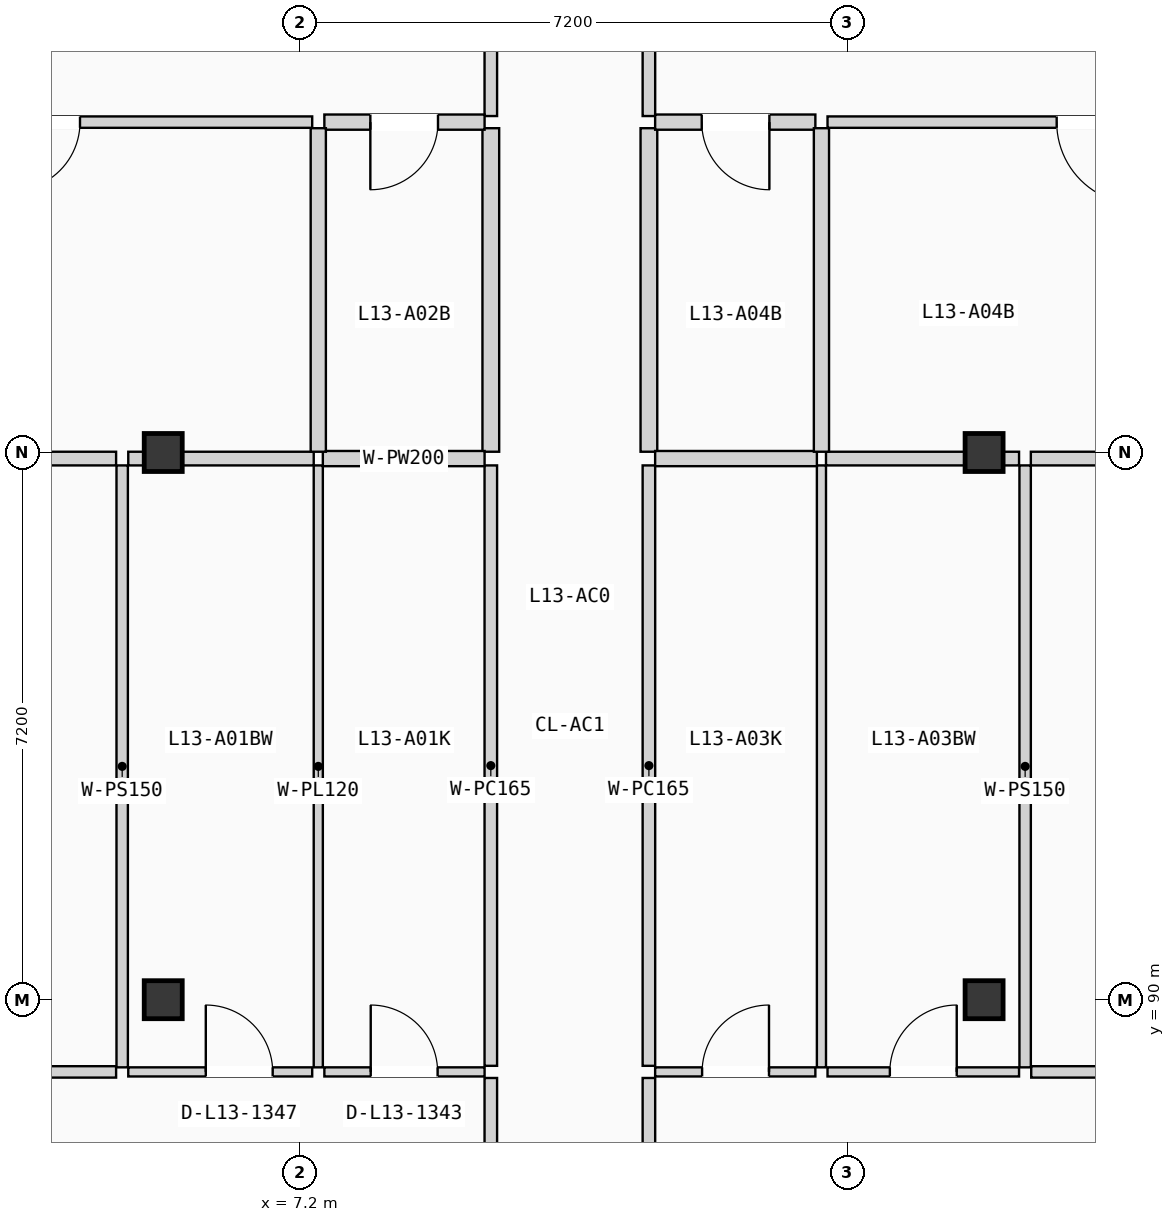
"""IFC4 building model, lengths in metres.
Left out: names, types, materials, properties, quantities, classifications, styles, units other than length and angle.
Written with IfcOpenShell. Run it as: python <this file> out.ifc"""

import sys

from ifc_helpers import new_model, si_unit, direction, frame, frame_2d, origin, origin_2d, place, context, subcontext, project, spatial, rectangle, extrude, element, fill, save


model = new_model("IFC4")
c1 = context("Model", 3, precision=1e-05, world=origin(), true_north=direction((0.0, 1.0)))
c2 = subcontext(c1, "Body", "Model", "MODEL_VIEW")
j1 = project(units=[si_unit("LENGTHUNIT", "METRE"), si_unit("PLANEANGLEUNIT", "RADIAN")], contexts=[c1])
p1 = place(None, origin())
s1 = spatial("IfcSite", under=j1, at=p1, CompositionType="ELEMENT")
p2 = place(p1, origin())
s2 = spatial("IfcBuilding", under=s1, at=p2, CompositionType="ELEMENT")
p3 = place(p2, frame((0.0, 0.0, 43.575)))
s3 = spatial("IfcBuildingStorey", under=s2, at=p3, CompositionType="ELEMENT", Elevation=43.575)
for number, where, z_axis, x_axis in (
    (1, (5.4, 90.0, 0.0), (0.0, 0.0, 1.0), (1.0, 0.0, 0.0)),
    (2, (5.4, 97.2, 0.0), (0.0, 0.0, 1.0), (1.0, 0.0, 0.0)),
    (3, (16.2, 90.0, 0.0), (0.0, 0.0, 1.0), (1.0, 0.0, 0.0)),
    (4, (16.2, 97.2, 0.0), (0.0, 0.0, 1.0), (1.0, 0.0, 0.0)),
):
    element("IfcColumn", number, at=place(p3, frame(where, z_axis=z_axis, x_axis=x_axis)), inside=s3, PredefinedType="COLUMN", context=c2, shape_type="SweptSolid", body=[
        extrude(rectangle(XDim=0.5, YDim=0.5, at=origin_2d()), origin(), (0.0, 0.0, 1.0), 3.15),
    ])
p4 = place(p3, frame((9.71, 83.83, 0.0), z_axis=(0.0, 0.0, 1.0), x_axis=(0.0, 1.0, 0.0)))
e5 = element("IfcWall", 5, at=p4, inside=s3, PredefinedType="PARTITIONING", context=c2, shape_type="SweptSolid", body=[
    extrude(rectangle(XDim=5.14, YDim=0.165, at=frame_2d((2.57, 0.0))), origin(), (0.0, 0.0, 1.0), 2.87),
])
p5 = place(p4, frame((2.08, 0.0, 0.0)))
e6 = element("IfcOpeningElement", 6, at=p5, cuts=e5, PredefinedType="OPENING", context=c2, shape_type="SweptSolid", body=[
    extrude(rectangle(XDim=0.98, YDim=2.08, at=frame_2d((0.49, 1.04))), frame((0.0, 0.093, 0.0), z_axis=(0.0, -1.0, 0.0), x_axis=(1.0, 0.0, 0.0)), (0.0, 0.0, 1.0), 0.185),
])
p6 = place(p3, frame((9.71, 89.13, 0.0), z_axis=(0.0, 0.0, 1.0), x_axis=(0.0, 1.0, 0.0)))
e7 = element("IfcWall", 7, at=p6, inside=s3, PredefinedType="PARTITIONING", context=c2, shape_type="SweptSolid", body=[
    extrude(rectangle(XDim=7.9, YDim=0.165, at=frame_2d((3.95, 0.0))), origin(), (0.0, 0.0, 1.0), 2.87),
])
p7 = place(p3, frame((9.71, 101.627, 0.0), z_axis=(0.0, 0.0, 1.0), x_axis=(0.0, 1.0, 0.0)))
e8 = element("IfcWall", 8, at=p7, inside=s3, PredefinedType="PARTITIONING", context=c2, shape_type="SweptSolid", body=[
    extrude(rectangle(XDim=5.156, YDim=0.165, at=frame_2d((2.578, 0.0))), origin(), (0.0, 0.0, 1.0), 2.87),
])
p8 = place(p7, frame((2.088, 0.0, 0.0)))
e9 = element("IfcOpeningElement", 9, at=p8, cuts=e8, PredefinedType="OPENING", context=c2, shape_type="SweptSolid", body=[
    extrude(rectangle(XDim=0.98, YDim=2.08, at=frame_2d((0.49, 1.04))), frame((0.0, 0.093, 0.0), z_axis=(0.0, -1.0, 0.0), x_axis=(1.0, 0.0, 0.0)), (0.0, 0.0, 1.0), 0.185),
])
p9 = place(p3, frame((9.71, 97.21, 0.0), z_axis=(0.0, 0.0, 1.0), x_axis=(0.0, 1.0, 0.0)))
e10 = element("IfcWall", 10, at=p9, inside=s3, PredefinedType="PLUMBINGWALL", context=c2, shape_type="SweptSolid", body=[
    extrude(rectangle(XDim=4.257, YDim=0.22, at=frame_2d((2.128, 0.0))), origin(), (0.0, 0.0, 1.0), 2.87),
])
p10 = place(p3, frame((11.79, 83.83, 0.0), z_axis=(0.0, 0.0, 1.0), x_axis=(0.0, 1.0, 0.0)))
e11 = element("IfcWall", 11, at=p10, inside=s3, PredefinedType="PARTITIONING", context=c2, shape_type="SweptSolid", body=[
    extrude(rectangle(XDim=5.14, YDim=0.165, at=frame_2d((2.57, 0.0))), origin(), (0.0, 0.0, 1.0), 2.87),
])
p11 = place(p10, frame((2.08, 0.0, 0.0)))
e12 = element("IfcOpeningElement", 12, at=p11, cuts=e11, PredefinedType="OPENING", context=c2, shape_type="SweptSolid", body=[
    extrude(rectangle(XDim=0.98, YDim=2.08, at=frame_2d((0.49, 1.04))), frame((0.0, 0.093, 0.0), z_axis=(0.0, -1.0, 0.0), x_axis=(1.0, 0.0, 0.0)), (0.0, 0.0, 1.0), 0.185),
])
p12 = place(p3, frame((11.79, 89.13, 0.0), z_axis=(0.0, 0.0, 1.0), x_axis=(0.0, 1.0, 0.0)))
e13 = element("IfcWall", 13, at=p12, inside=s3, PredefinedType="PARTITIONING", context=c2, shape_type="SweptSolid", body=[
    extrude(rectangle(XDim=7.9, YDim=0.165, at=frame_2d((3.95, 0.0))), origin(), (0.0, 0.0, 1.0), 2.87),
])
p13 = place(p3, frame((11.79, 101.627, 0.0), z_axis=(0.0, 0.0, 1.0), x_axis=(0.0, 1.0, 0.0)))
e14 = element("IfcWall", 14, at=p13, inside=s3, PredefinedType="PARTITIONING", context=c2, shape_type="SweptSolid", body=[
    extrude(rectangle(XDim=5.156, YDim=0.165, at=frame_2d((2.578, 0.0))), origin(), (0.0, 0.0, 1.0), 2.87),
])
p14 = place(p13, frame((2.088, 0.0, 0.0)))
e15 = element("IfcOpeningElement", 15, at=p14, cuts=e14, PredefinedType="OPENING", context=c2, shape_type="SweptSolid", body=[
    extrude(rectangle(XDim=0.98, YDim=2.08, at=frame_2d((0.49, 1.04))), frame((0.0, 0.093, 0.0), z_axis=(0.0, -1.0, 0.0), x_axis=(1.0, 0.0, 0.0)), (0.0, 0.0, 1.0), 0.185),
])
p15 = place(p3, frame((11.79, 97.21, 0.0), z_axis=(0.0, 0.0, 1.0), x_axis=(0.0, 1.0, 0.0)))
e16 = element("IfcWall", 16, at=p15, inside=s3, PredefinedType="PLUMBINGWALL", context=c2, shape_type="SweptSolid", body=[
    extrude(rectangle(XDim=4.257, YDim=0.22, at=frame_2d((2.128, 0.0))), origin(), (0.0, 0.0, 1.0), 2.87),
])
p16 = place(p3, frame((7.52, 89.05, 0.0), z_axis=(0.0, 0.0, 1.0), x_axis=(1.0, 0.0, 0.0)))
e17 = element("IfcWall", 17, at=p16, inside=s3, PredefinedType="PARTITIONING", context=c2, shape_type="SweptSolid", body=[
    extrude(rectangle(XDim=2.108, YDim=0.12, at=frame_2d((1.054, 0.0))), origin(), (0.0, 0.0, 1.0), 2.87),
])
p17 = place(p16, frame((0.61, 0.0, 0.0)))
e18 = element("IfcOpeningElement", 18, at=p17, cuts=e17, PredefinedType="OPENING", context=c2, shape_type="SweptSolid", body=[
    extrude(rectangle(XDim=0.88, YDim=2.02, at=frame_2d((0.44, 1.01))), frame((0.0, 0.07, 0.0), z_axis=(0.0, -1.0, 0.0), x_axis=(1.0, 0.0, 0.0)), (0.0, 0.0, 1.0), 0.14),
])
p18 = place(p3, frame((0.32, 89.05, 0.0), z_axis=(0.0, 0.0, 1.0), x_axis=(1.0, 0.0, 0.0)))
e19 = element("IfcWall", 19, at=p18, inside=s3, PredefinedType="PARTITIONING", context=c2, shape_type="SweptSolid", body=[
    extrude(rectangle(XDim=4.46, YDim=0.15, at=frame_2d((2.23, 0.0))), origin(), (0.0, 0.0, 1.0), 2.87),
])
p19 = place(p18, frame((1.725, 0.0, 0.0)))
e20 = element("IfcOpeningElement", 20, at=p19, cuts=e19, PredefinedType="OPENING", context=c2, shape_type="SweptSolid", body=[
    extrude(rectangle(XDim=1.04, YDim=2.08, at=frame_2d((0.52, 1.04))), frame((0.0, 0.085, 0.0), z_axis=(0.0, -1.0, 0.0), x_axis=(1.0, 0.0, 0.0)), (0.0, 0.0, 1.0), 0.17),
])
p20 = place(p3, frame((4.94, 89.05, 0.0), z_axis=(0.0, 0.0, 1.0), x_axis=(1.0, 0.0, 0.0)))
e21 = element("IfcWall", 21, at=p20, inside=s3, PredefinedType="PARTITIONING", context=c2, shape_type="SweptSolid", body=[
    extrude(rectangle(XDim=2.42, YDim=0.12, at=frame_2d((1.21, 0.0))), origin(), (0.0, 0.0, 1.0), 2.87),
])
p21 = place(p20, frame((1.02, 0.0, 0.0)))
e22 = element("IfcOpeningElement", 22, at=p21, cuts=e21, PredefinedType="OPENING", context=c2, shape_type="SweptSolid", body=[
    extrude(rectangle(XDim=0.88, YDim=2.02, at=frame_2d((0.44, 1.01))), frame((0.0, 0.07, 0.0), z_axis=(0.0, -1.0, 0.0), x_axis=(1.0, 0.0, 0.0)), (0.0, 0.0, 1.0), 0.14),
])
p22 = place(p3, frame((7.44, 89.11, 0.0), z_axis=(0.0, 0.0, 1.0), x_axis=(0.0, 1.0, 0.0)))
e23 = element("IfcWall", 23, at=p22, inside=s3, PredefinedType="PARTITIONING", context=c2, shape_type="SweptSolid", body=[
    extrude(rectangle(XDim=7.92, YDim=0.12, at=frame_2d((3.96, 0.0))), origin(), (0.0, 0.0, 1.0), 2.87),
])
p23 = place(p3, frame((7.5, 97.12, 0.0), z_axis=(0.0, 0.0, 1.0), x_axis=(1.0, 0.0, 0.0)))
e24 = element("IfcWall", 24, at=p23, inside=s3, PredefinedType="PLUMBINGWALL", context=c2, shape_type="SweptSolid", body=[
    extrude(rectangle(XDim=2.128, YDim=0.2, at=frame_2d((1.064, 0.0))), origin(), (0.0, 0.0, 1.0), 2.17),
])
p24 = place(p3, frame((4.86, 89.11, 0.0), z_axis=(0.0, 0.0, 1.0), x_axis=(0.0, 1.0, 0.0)))
e25 = element("IfcWall", 25, at=p24, inside=s3, PredefinedType="PARTITIONING", context=c2, shape_type="SweptSolid", body=[
    extrude(rectangle(XDim=7.92, YDim=0.15, at=frame_2d((3.96, 0.0))), origin(), (0.0, 0.0, 1.0), 2.87),
])
p25 = place(p3, frame((0.32, 97.12, 0.0), z_axis=(0.0, 0.0, 1.0), x_axis=(1.0, 0.0, 0.0)))
e26 = element("IfcWall", 26, at=p25, inside=s3, PredefinedType="PARTITIONING", context=c2, shape_type="SweptSolid", body=[
    extrude(rectangle(XDim=4.46, YDim=0.18, at=frame_2d((2.23, 0.0))), origin(), (0.0, 0.0, 1.0), 2.22),
])
p26 = place(p3, frame((4.94, 97.12, 0.0), z_axis=(0.0, 0.0, 1.0), x_axis=(1.0, 0.0, 0.0)))
e27 = element("IfcWall", 27, at=p26, inside=s3, PredefinedType="PARTITIONING", context=c2, shape_type="SweptSolid", body=[
    extrude(rectangle(XDim=2.44, YDim=0.18, at=frame_2d((1.22, 0.0))), origin(), (0.0, 0.0, 1.0), 2.17),
])
p27 = place(p3, frame((7.52, 101.547, 0.0), z_axis=(0.0, 0.0, 1.0), x_axis=(1.0, 0.0, 0.0)))
e28 = element("IfcWall", 28, at=p27, inside=s3, PredefinedType="PLUMBINGWALL", context=c2, shape_type="SweptSolid", body=[
    extrude(rectangle(XDim=2.108, YDim=0.2, at=frame_2d((1.054, 0.0))), origin(), (0.0, 0.0, 1.0), 2.87),
])
p28 = place(p27, frame((0.605, 0.0, 0.0)))
e29 = element("IfcOpeningElement", 29, at=p28, cuts=e28, PredefinedType="OPENING", context=c2, shape_type="SweptSolid", body=[
    extrude(rectangle(XDim=0.89, YDim=2.03, at=frame_2d((0.445, 1.015))), frame((0.0, 0.11, 0.0), z_axis=(0.0, -1.0, 0.0), x_axis=(1.0, 0.0, 0.0)), (0.0, 0.0, 1.0), 0.22),
])
p29 = place(p3, frame((0.32, 101.547, 0.0), z_axis=(0.0, 0.0, 1.0), x_axis=(1.0, 0.0, 0.0)))
e30 = element("IfcWall", 30, at=p29, inside=s3, PredefinedType="PARTITIONING", context=c2, shape_type="SweptSolid", body=[
    extrude(rectangle(XDim=7.04, YDim=0.15, at=frame_2d((3.52, 0.0))), origin(), (0.0, 0.0, 1.0), 2.87),
])
p30 = place(p29, frame((3.085, 0.0, 0.0)))
e31 = element("IfcOpeningElement", 31, at=p30, cuts=e30, PredefinedType="OPENING", context=c2, shape_type="SweptSolid", body=[
    extrude(rectangle(XDim=0.9, YDim=2.04, at=frame_2d((0.45, 1.02))), frame((0.0, 0.085, 0.0), z_axis=(0.0, -1.0, 0.0), x_axis=(1.0, 0.0, 0.0)), (0.0, 0.0, 1.0), 0.17),
])
p31 = place(p3, frame((7.44, 97.21, 0.0), z_axis=(0.0, 0.0, 1.0), x_axis=(0.0, 1.0, 0.0)))
e32 = element("IfcWall", 32, at=p31, inside=s3, PredefinedType="PLUMBINGWALL", context=c2, shape_type="SweptSolid", body=[
    extrude(rectangle(XDim=4.257, YDim=0.2, at=frame_2d((2.128, 0.0))), origin(), (0.0, 0.0, 1.0), 2.87),
])
p32 = place(p3, frame((11.872, 89.05, 0.0), z_axis=(0.0, 0.0, 1.0), x_axis=(1.0, 0.0, 0.0)))
e33 = element("IfcWall", 33, at=p32, inside=s3, PredefinedType="PARTITIONING", context=c2, shape_type="SweptSolid", body=[
    extrude(rectangle(XDim=2.108, YDim=0.12, at=frame_2d((1.054, 0.0))), origin(), (0.0, 0.0, 1.0), 2.87),
])
p33 = place(p32, frame((0.618, 0.0, 0.0)))
e34 = element("IfcOpeningElement", 34, at=p33, cuts=e33, PredefinedType="OPENING", context=c2, shape_type="SweptSolid", body=[
    extrude(rectangle(XDim=0.88, YDim=2.02, at=frame_2d((0.44, 1.01))), frame((0.0, 0.07, 0.0), z_axis=(0.0, -1.0, 0.0), x_axis=(1.0, 0.0, 0.0)), (0.0, 0.0, 1.0), 0.14),
])
p34 = place(p3, frame((16.82, 89.05, 0.0), z_axis=(0.0, 0.0, 1.0), x_axis=(1.0, 0.0, 0.0)))
e35 = element("IfcWall", 35, at=p34, inside=s3, PredefinedType="PARTITIONING", context=c2, shape_type="SweptSolid", body=[
    extrude(rectangle(XDim=4.46, YDim=0.15, at=frame_2d((2.23, 0.0))), origin(), (0.0, 0.0, 1.0), 2.87),
])
p35 = place(p34, frame((1.715, 0.0, 0.0)))
e36 = element("IfcOpeningElement", 36, at=p35, cuts=e35, PredefinedType="OPENING", context=c2, shape_type="SweptSolid", body=[
    extrude(rectangle(XDim=1.0, YDim=2.06, at=frame_2d((0.5, 1.03))), frame((0.0, 0.085, 0.0), z_axis=(0.0, -1.0, 0.0), x_axis=(1.0, 0.0, 0.0)), (0.0, 0.0, 1.0), 0.17),
])
p36 = place(p3, frame((14.14, 89.05, 0.0), z_axis=(0.0, 0.0, 1.0), x_axis=(1.0, 0.0, 0.0)))
e37 = element("IfcWall", 37, at=p36, inside=s3, PredefinedType="PARTITIONING", context=c2, shape_type="SweptSolid", body=[
    extrude(rectangle(XDim=2.52, YDim=0.12, at=frame_2d((1.26, 0.0))), origin(), (0.0, 0.0, 1.0), 2.87),
])
p37 = place(p36, frame((0.82, 0.0, 0.0)))
e38 = element("IfcOpeningElement", 38, at=p37, cuts=e37, PredefinedType="OPENING", context=c2, shape_type="SweptSolid", body=[
    extrude(rectangle(XDim=0.88, YDim=2.02, at=frame_2d((0.44, 1.01))), frame((0.0, 0.07, 0.0), z_axis=(0.0, -1.0, 0.0), x_axis=(1.0, 0.0, 0.0)), (0.0, 0.0, 1.0), 0.14),
])
p38 = place(p3, frame((14.06, 89.11, 0.0), z_axis=(0.0, 0.0, 1.0), x_axis=(0.0, 1.0, 0.0)))
e39 = element("IfcWall", 39, at=p38, inside=s3, PredefinedType="PARTITIONING", context=c2, shape_type="SweptSolid", body=[
    extrude(rectangle(XDim=7.92, YDim=0.12, at=frame_2d((3.96, 0.0))), origin(), (0.0, 0.0, 1.0), 2.87),
])
p39 = place(p3, frame((11.872, 97.12, 0.0), z_axis=(0.0, 0.0, 1.0), x_axis=(1.0, 0.0, 0.0)))
e40 = element("IfcWall", 40, at=p39, inside=s3, PredefinedType="PLUMBINGWALL", context=c2, shape_type="SweptSolid", body=[
    extrude(rectangle(XDim=2.128, YDim=0.2, at=frame_2d((1.064, 0.0))), origin(), (0.0, 0.0, 1.0), 2.17),
])
p40 = place(p3, frame((16.74, 89.11, 0.0), z_axis=(0.0, 0.0, 1.0), x_axis=(0.0, 1.0, 0.0)))
e41 = element("IfcWall", 41, at=p40, inside=s3, PredefinedType="PARTITIONING", context=c2, shape_type="SweptSolid", body=[
    extrude(rectangle(XDim=7.92, YDim=0.15, at=frame_2d((3.96, 0.0))), origin(), (0.0, 0.0, 1.0), 2.87),
])
p41 = place(p3, frame((16.815, 97.12, 0.0), z_axis=(0.0, 0.0, 1.0), x_axis=(1.0, 0.0, 0.0)))
e42 = element("IfcWall", 42, at=p41, inside=s3, PredefinedType="PARTITIONING", context=c2, shape_type="SweptSolid", body=[
    extrude(rectangle(XDim=4.465, YDim=0.18, at=frame_2d((2.232, 0.0))), origin(), (0.0, 0.0, 1.0), 2.22),
])
p42 = place(p3, frame((14.12, 97.12, 0.0), z_axis=(0.0, 0.0, 1.0), x_axis=(1.0, 0.0, 0.0)))
e43 = element("IfcWall", 43, at=p42, inside=s3, PredefinedType="PARTITIONING", context=c2, shape_type="SweptSolid", body=[
    extrude(rectangle(XDim=2.54, YDim=0.18, at=frame_2d((1.27, 0.0))), origin(), (0.0, 0.0, 1.0), 2.17),
])
p43 = place(p3, frame((11.872, 101.547, 0.0), z_axis=(0.0, 0.0, 1.0), x_axis=(1.0, 0.0, 0.0)))
e44 = element("IfcWall", 44, at=p43, inside=s3, PredefinedType="PLUMBINGWALL", context=c2, shape_type="SweptSolid", body=[
    extrude(rectangle(XDim=2.108, YDim=0.2, at=frame_2d((1.054, 0.0))), origin(), (0.0, 0.0, 1.0), 2.87),
])
p44 = place(p43, frame((0.613, 0.0, 0.0)))
e45 = element("IfcOpeningElement", 45, at=p44, cuts=e44, PredefinedType="OPENING", context=c2, shape_type="SweptSolid", body=[
    extrude(rectangle(XDim=0.89, YDim=2.03, at=frame_2d((0.445, 1.015))), frame((0.0, 0.11, 0.0), z_axis=(0.0, -1.0, 0.0), x_axis=(1.0, 0.0, 0.0)), (0.0, 0.0, 1.0), 0.22),
])
p45 = place(p3, frame((14.14, 101.547, 0.0), z_axis=(0.0, 0.0, 1.0), x_axis=(1.0, 0.0, 0.0)))
e46 = element("IfcWall", 46, at=p45, inside=s3, PredefinedType="PARTITIONING", context=c2, shape_type="SweptSolid", body=[
    extrude(rectangle(XDim=7.14, YDim=0.15, at=frame_2d((3.57, 0.0))), origin(), (0.0, 0.0, 1.0), 2.87),
])
p46 = place(p45, frame((3.015, 0.0, 0.0)))
e47 = element("IfcOpeningElement", 47, at=p46, cuts=e46, PredefinedType="OPENING", context=c2, shape_type="SweptSolid", body=[
    extrude(rectangle(XDim=1.08, YDim=2.1, at=frame_2d((0.54, 1.05))), frame((0.0, 0.085, 0.0), z_axis=(0.0, -1.0, 0.0), x_axis=(1.0, 0.0, 0.0)), (0.0, 0.0, 1.0), 0.17),
])
p47 = place(p3, frame((14.06, 97.21, 0.0), z_axis=(0.0, 0.0, 1.0), x_axis=(0.0, 1.0, 0.0)))
e48 = element("IfcWall", 48, at=p47, inside=s3, PredefinedType="PLUMBINGWALL", context=c2, shape_type="SweptSolid", body=[
    extrude(rectangle(XDim=4.257, YDim=0.2, at=frame_2d((2.128, 0.0))), origin(), (0.0, 0.0, 1.0), 2.87),
])
p48 = place(p17, origin())
e49 = element("IfcDoor", 49, at=p48, inside=s3, OperationType="SINGLE_SWING_LEFT", PredefinedType="DOOR", context=c2, shape_type="SweptSolid", body=[
    extrude(rectangle(XDim=0.88, YDim=2.02, at=frame_2d((0.44, 1.01))), frame((0.0, 0.025, 0.0), z_axis=(0.0, -1.0, 0.0), x_axis=(1.0, 0.0, 0.0)), (0.0, 0.0, 1.0), 0.05),
])
fill(e18, e49)
p49 = place(p21, origin())
e50 = element("IfcDoor", 50, at=p49, inside=s3, OperationType="SINGLE_SWING_LEFT", PredefinedType="DOOR", context=c2, shape_type="SweptSolid", body=[
    extrude(rectangle(XDim=0.88, YDim=2.02, at=frame_2d((0.44, 1.01))), frame((0.0, 0.025, 0.0), z_axis=(0.0, -1.0, 0.0), x_axis=(1.0, 0.0, 0.0)), (0.0, 0.0, 1.0), 0.05),
])
fill(e22, e50)
p50 = place(p28, frame((0.89, 0.0, 0.0), z_axis=(0.0, 0.0, 1.0), x_axis=(-1.0, 0.0, 0.0)))
e51 = element("IfcDoor", 51, at=p50, inside=s3, OperationType="SINGLE_SWING_LEFT", PredefinedType="DOOR", context=c2, shape_type="SweptSolid", body=[
    extrude(rectangle(XDim=0.89, YDim=2.03, at=frame_2d((0.445, 1.015))), frame((0.0, 0.025, 0.0), z_axis=(0.0, -1.0, 0.0), x_axis=(1.0, 0.0, 0.0)), (0.0, 0.0, 1.0), 0.05),
])
fill(e29, e51)
p51 = place(p30, frame((0.9, 0.0, 0.0), z_axis=(0.0, 0.0, 1.0), x_axis=(-1.0, 0.0, 0.0)))
e52 = element("IfcDoor", 52, at=p51, inside=s3, OperationType="SINGLE_SWING_LEFT", PredefinedType="DOOR", context=c2, shape_type="SweptSolid", body=[
    extrude(rectangle(XDim=0.9, YDim=2.04, at=frame_2d((0.45, 1.02))), frame((0.0, 0.025, 0.0), z_axis=(0.0, -1.0, 0.0), x_axis=(1.0, 0.0, 0.0)), (0.0, 0.0, 1.0), 0.05),
])
fill(e31, e52)
p52 = place(p33, origin())
e53 = element("IfcDoor", 53, at=p52, inside=s3, OperationType="SINGLE_SWING_RIGHT", PredefinedType="DOOR", context=c2, shape_type="SweptSolid", body=[
    extrude(rectangle(XDim=0.88, YDim=2.02, at=frame_2d((0.44, 1.01))), frame((0.0, 0.025, 0.0), z_axis=(0.0, -1.0, 0.0), x_axis=(1.0, 0.0, 0.0)), (0.0, 0.0, 1.0), 0.05),
])
fill(e34, e53)
p53 = place(p37, origin())
e54 = element("IfcDoor", 54, at=p53, inside=s3, OperationType="SINGLE_SWING_RIGHT", PredefinedType="DOOR", context=c2, shape_type="SweptSolid", body=[
    extrude(rectangle(XDim=0.88, YDim=2.02, at=frame_2d((0.44, 1.01))), frame((0.0, 0.025, 0.0), z_axis=(0.0, -1.0, 0.0), x_axis=(1.0, 0.0, 0.0)), (0.0, 0.0, 1.0), 0.05),
])
fill(e38, e54)
p54 = place(p44, frame((0.89, 0.0, 0.0), z_axis=(0.0, 0.0, 1.0), x_axis=(-1.0, 0.0, 0.0)))
e55 = element("IfcDoor", 55, at=p54, inside=s3, OperationType="SINGLE_SWING_RIGHT", PredefinedType="DOOR", context=c2, shape_type="SweptSolid", body=[
    extrude(rectangle(XDim=0.89, YDim=2.03, at=frame_2d((0.445, 1.015))), frame((0.0, 0.025, 0.0), z_axis=(0.0, -1.0, 0.0), x_axis=(1.0, 0.0, 0.0)), (0.0, 0.0, 1.0), 0.05),
])
fill(e45, e55)
p55 = place(p46, frame((1.08, 0.0, 0.0), z_axis=(0.0, 0.0, 1.0), x_axis=(-1.0, 0.0, 0.0)))
e56 = element("IfcDoor", 56, at=p55, inside=s3, OperationType="SINGLE_SWING_RIGHT", PredefinedType="DOOR", context=c2, shape_type="SweptSolid", body=[
    extrude(rectangle(XDim=1.08, YDim=2.1, at=frame_2d((0.54, 1.05))), frame((0.0, 0.025, 0.0), z_axis=(0.0, -1.0, 0.0), x_axis=(1.0, 0.0, 0.0)), (0.0, 0.0, 1.0), 0.05),
])
fill(e47, e56)
save(model, sys.argv[1])
